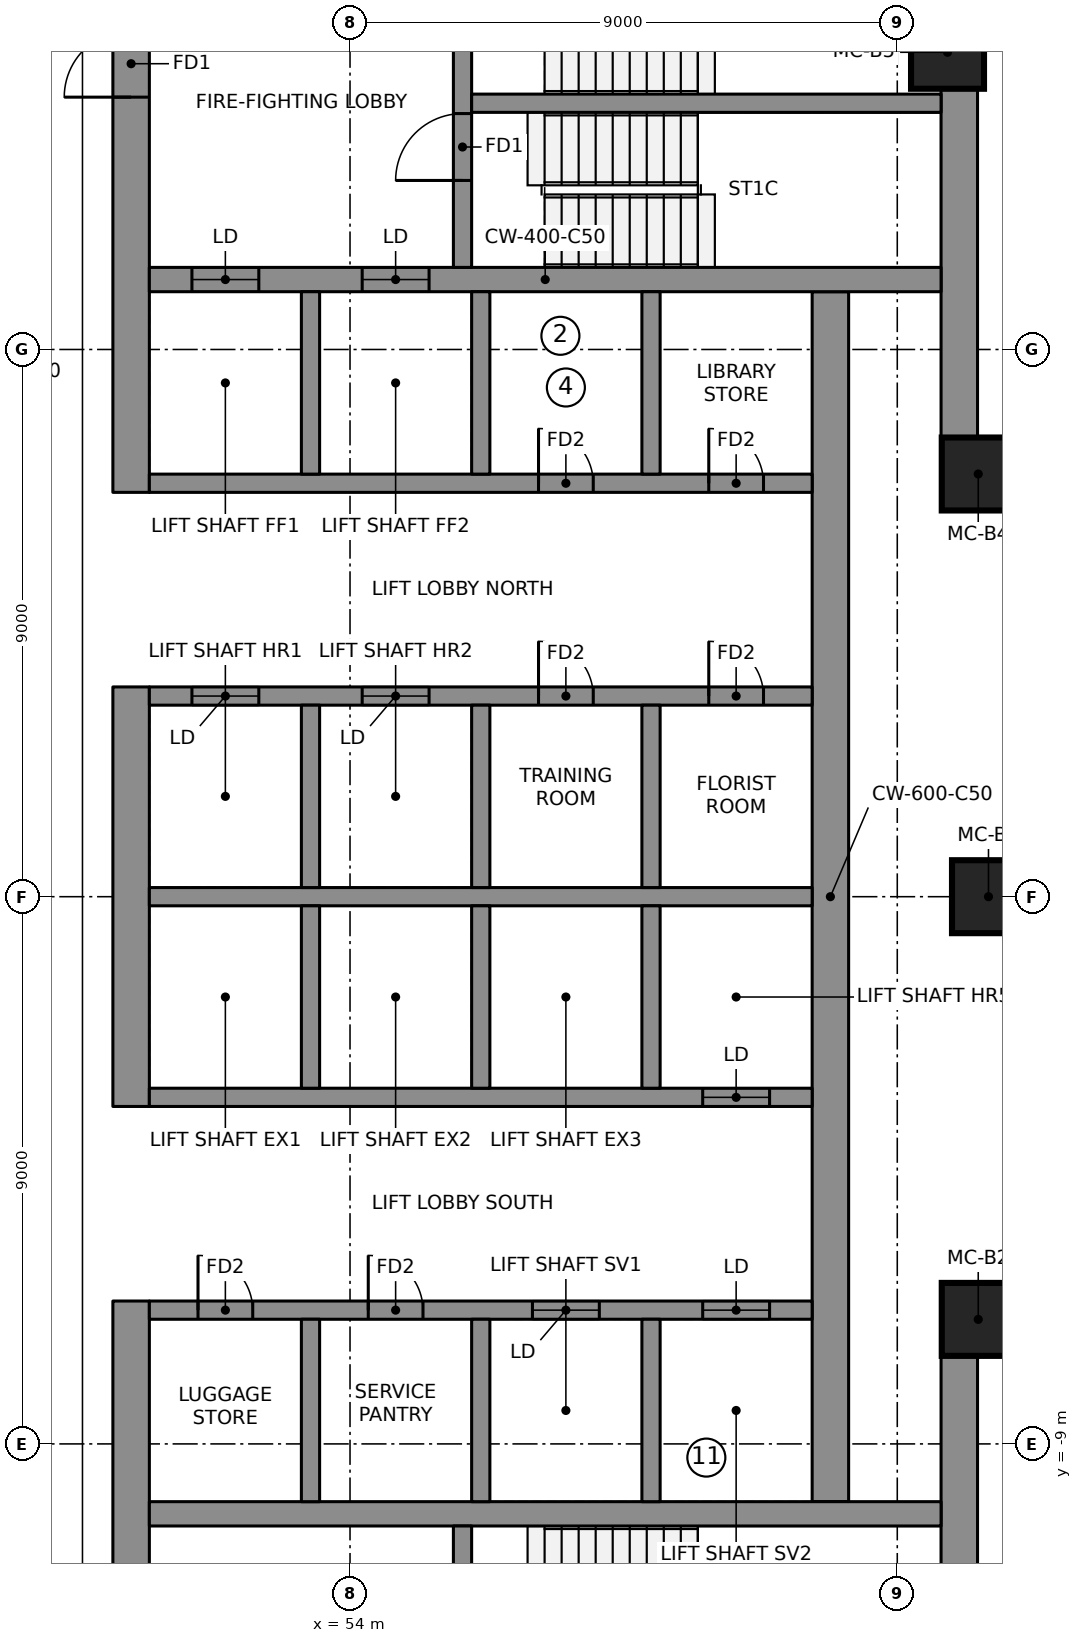
"""IFC4 building model, lengths in metres.
Left out: names, types, materials, properties, quantities, classifications, styles, units other than length and angle.
Written with IfcOpenShell. Run it as: python <this file> out.ifc"""

import sys

from ifc_helpers import new_model, si_unit, direction, frame, frame_2d, origin, origin_2d, place, context, subcontext, project, spatial, rectangle, extrude, element, fill, save


model = new_model("IFC4")
c1 = context("Model", 3, precision=1e-05, world=origin(), true_north=direction((0.0, 1.0)))
c2 = subcontext(c1, "Body", "Model", "MODEL_VIEW")
j1 = project(units=[si_unit("LENGTHUNIT", "METRE"), si_unit("PLANEANGLEUNIT", "RADIAN")], contexts=[c1])
p1 = place(None, origin())
s1 = spatial("IfcSite", under=j1, at=p1, CompositionType="ELEMENT")
p2 = place(p1, origin())
s2 = spatial("IfcBuilding", under=s1, at=p2, CompositionType="ELEMENT")
p3 = place(p2, frame((0.0, 0.0, 231.45)))
s3 = spatial("IfcBuildingStorey", under=s2, at=p3, CompositionType="ELEMENT", Elevation=231.45)
p4 = place(p3, frame((50.4, 6.65, 0.0), z_axis=(0.0, 0.0, 1.0), x_axis=(0.0, 1.0, 0.0)))
e1 = element("IfcWall", 1, at=p4, inside=s3, PredefinedType="SHEAR", context=c2, shape_type="SweptSolid", body=[
    extrude(rectangle(XDim=9.7, YDim=0.6, at=frame_2d((4.85, 0.0))), origin(), (0.0, 0.0, 1.0), 3.55),
])
p5 = place(p4, frame((6.5, 0.0, 0.0)))
e2 = element("IfcOpeningElement", 2, at=p5, cuts=e1, PredefinedType="OPENING", context=c2, shape_type="SweptSolid", body=[
    extrude(rectangle(XDim=1.1, YDim=2.1, at=frame_2d((0.55, 1.05))), frame((0.0, 0.31, 0.0), z_axis=(0.0, -1.0, 0.0), x_axis=(1.0, 0.0, 0.0)), (0.0, 0.0, 1.0), 0.62),
])
p6 = place(p3, frame((50.4, -3.45, 0.0), z_axis=(0.0, 0.0, 1.0), x_axis=(0.0, 1.0, 0.0)))
e3 = element("IfcWall", 3, at=p6, inside=s3, PredefinedType="SHEAR", context=c2, shape_type="SweptSolid", body=[
    extrude(rectangle(XDim=6.9, YDim=0.6, at=frame_2d((3.45, 0.0))), origin(), (0.0, 0.0, 1.0), 3.55),
])
p7 = place(p3, frame((50.4, -16.35, 0.0), z_axis=(0.0, 0.0, 1.0), x_axis=(0.0, 1.0, 0.0)))
e4 = element("IfcWall", 4, at=p7, inside=s3, PredefinedType="SHEAR", context=c2, shape_type="SweptSolid", body=[
    extrude(rectangle(XDim=9.7, YDim=0.6, at=frame_2d((4.85, 0.0))), origin(), (0.0, 0.0, 1.0), 3.55),
])
p8 = place(p7, frame((2.1, 0.0, 0.0)))
e5 = element("IfcOpeningElement", 5, at=p8, cuts=e4, PredefinedType="OPENING", context=c2, shape_type="SweptSolid", body=[
    extrude(rectangle(XDim=1.1, YDim=2.1, at=frame_2d((0.55, 1.05))), frame((0.0, 0.31, 0.0), z_axis=(0.0, -1.0, 0.0), x_axis=(1.0, 0.0, 0.0)), (0.0, 0.0, 1.0), 0.62),
])
for number, where, z_axis, x_axis in (
    (6, (64.02, 7.502, 0.0), (0.0, 0.0, 1.0), (0.0, 1.0, 0.0)),
    (7, (64.02, -15.75, 0.0), (0.0, 0.0, 1.0), (0.0, 1.0, 0.0)),
):
    element("IfcWall", number, at=place(p3, frame(where, z_axis=z_axis, x_axis=x_axis)), inside=s3, PredefinedType="SHEAR", context=c2, shape_type="SweptSolid", body=[
        extrude(rectangle(XDim=8.248, YDim=0.6, at=frame_2d((4.124, 0.0))), origin(), (0.0, 0.0, 1.0), 3.55),
    ])
p9 = place(p3, frame((61.9, -9.95, 0.0), z_axis=(0.0, 0.0, 1.0), x_axis=(0.0, 1.0, 0.0)))
e8 = element("IfcWall", 8, at=p9, inside=s3, PredefinedType="SHEAR", context=c2, shape_type="SweptSolid", body=[
    extrude(rectangle(XDim=19.9, YDim=0.6, at=frame_2d((9.95, 0.0))), origin(), (0.0, 0.0, 1.0), 3.55),
])
p10 = place(p3, frame((50.7, 10.15, 0.0), z_axis=(0.0, 0.0, 1.0), x_axis=(1.0, 0.0, 0.0)))
e9 = element("IfcWall", 9, at=p10, inside=s3, PredefinedType="SHEAR", context=c2, shape_type="SweptSolid", body=[
    extrude(rectangle(XDim=13.02, YDim=0.4, at=frame_2d((6.51, 0.0))), origin(), (0.0, 0.0, 1.0), 3.55),
])
p11 = place(p10, frame((0.7, 0.0, 0.0)))
e10 = element("IfcOpeningElement", 10, at=p11, cuts=e9, PredefinedType="OPENING", context=c2, shape_type="SweptSolid", body=[
    extrude(rectangle(XDim=1.1, YDim=2.1, at=frame_2d((0.55, 1.05))), frame((0.0, 0.21, 0.0), z_axis=(0.0, -1.0, 0.0), x_axis=(1.0, 0.0, 0.0)), (0.0, 0.0, 1.0), 0.42),
])
p12 = place(p10, frame((3.5, 0.0, 0.0)))
e11 = element("IfcOpeningElement", 11, at=p12, cuts=e9, PredefinedType="OPENING", context=c2, shape_type="SweptSolid", body=[
    extrude(rectangle(XDim=1.1, YDim=2.1, at=frame_2d((0.55, 1.05))), frame((0.0, 0.21, 0.0), z_axis=(0.0, -1.0, 0.0), x_axis=(1.0, 0.0, 0.0)), (0.0, 0.0, 1.0), 0.42),
])
p13 = place(p3, frame((50.7, -10.15, 0.0), z_axis=(0.0, 0.0, 1.0), x_axis=(1.0, 0.0, 0.0)))
e12 = element("IfcWall", 12, at=p13, inside=s3, PredefinedType="SHEAR", context=c2, shape_type="SweptSolid", body=[
    extrude(rectangle(XDim=13.02, YDim=0.4, at=frame_2d((6.51, 0.0))), origin(), (0.0, 0.0, 1.0), 3.55),
])
p14 = place(p3, frame((50.7, 0.0, 0.0), z_axis=(0.0, 0.0, 1.0), x_axis=(1.0, 0.0, 0.0)))
e13 = element("IfcWall", 13, at=p14, inside=s3, PredefinedType="SHEAR", context=c2, shape_type="SweptSolid", body=[
    extrude(rectangle(XDim=10.9, YDim=0.3, at=frame_2d((5.45, 0.0))), origin(), (0.0, 0.0, 1.0), 3.55),
])
p15 = place(p3, frame((50.7, 3.3, 0.0), z_axis=(0.0, 0.0, 1.0), x_axis=(1.0, 0.0, 0.0)))
e14 = element("IfcWall", 14, at=p15, inside=s3, PredefinedType="SHEAR", context=c2, shape_type="SweptSolid", body=[
    extrude(rectangle(XDim=10.9, YDim=0.3, at=frame_2d((5.45, 0.0))), origin(), (0.0, 0.0, 1.0), 3.55),
])
p16 = place(p15, frame((0.7, 0.0, 0.0)))
e15 = element("IfcOpeningElement", 15, at=p16, cuts=e14, PredefinedType="OPENING", context=c2, shape_type="SweptSolid", body=[
    extrude(rectangle(XDim=1.1, YDim=2.1, at=frame_2d((0.55, 1.05))), frame((0.0, 0.16, 0.0), z_axis=(0.0, -1.0, 0.0), x_axis=(1.0, 0.0, 0.0)), (0.0, 0.0, 1.0), 0.32),
])
p17 = place(p15, frame((3.5, 0.0, 0.0)))
e16 = element("IfcOpeningElement", 16, at=p17, cuts=e14, PredefinedType="OPENING", context=c2, shape_type="SweptSolid", body=[
    extrude(rectangle(XDim=1.1, YDim=2.1, at=frame_2d((0.55, 1.05))), frame((0.0, 0.16, 0.0), z_axis=(0.0, -1.0, 0.0), x_axis=(1.0, 0.0, 0.0)), (0.0, 0.0, 1.0), 0.32),
])
p18 = place(p15, frame((6.4, 0.0, 0.0)))
e17 = element("IfcOpeningElement", 17, at=p18, cuts=e14, PredefinedType="OPENING", context=c2, shape_type="SweptSolid", body=[
    extrude(rectangle(XDim=0.9, YDim=2.1, at=frame_2d((0.45, 1.05))), frame((0.0, 0.16, 0.0), z_axis=(0.0, -1.0, 0.0), x_axis=(1.0, 0.0, 0.0)), (0.0, 0.0, 1.0), 0.32),
])
p19 = place(p15, frame((9.2, 0.0, 0.0)))
e18 = element("IfcOpeningElement", 18, at=p19, cuts=e14, PredefinedType="OPENING", context=c2, shape_type="SweptSolid", body=[
    extrude(rectangle(XDim=0.9, YDim=2.1, at=frame_2d((0.45, 1.05))), frame((0.0, 0.16, 0.0), z_axis=(0.0, -1.0, 0.0), x_axis=(1.0, 0.0, 0.0)), (0.0, 0.0, 1.0), 0.32),
])
p20 = place(p3, frame((50.7, 6.8, 0.0), z_axis=(0.0, 0.0, 1.0), x_axis=(1.0, 0.0, 0.0)))
e19 = element("IfcWall", 19, at=p20, inside=s3, PredefinedType="SHEAR", context=c2, shape_type="SweptSolid", body=[
    extrude(rectangle(XDim=10.9, YDim=0.3, at=frame_2d((5.45, 0.0))), origin(), (0.0, 0.0, 1.0), 3.55),
])
p21 = place(p20, frame((6.4, 0.0, 0.0)))
e20 = element("IfcOpeningElement", 20, at=p21, cuts=e19, PredefinedType="OPENING", context=c2, shape_type="SweptSolid", body=[
    extrude(rectangle(XDim=0.9, YDim=2.1, at=frame_2d((0.45, 1.05))), frame((0.0, 0.16, 0.0), z_axis=(0.0, -1.0, 0.0), x_axis=(1.0, 0.0, 0.0)), (0.0, 0.0, 1.0), 0.32),
])
p22 = place(p20, frame((9.2, 0.0, 0.0)))
e21 = element("IfcOpeningElement", 21, at=p22, cuts=e19, PredefinedType="OPENING", context=c2, shape_type="SweptSolid", body=[
    extrude(rectangle(XDim=0.9, YDim=2.1, at=frame_2d((0.45, 1.05))), frame((0.0, 0.16, 0.0), z_axis=(0.0, -1.0, 0.0), x_axis=(1.0, 0.0, 0.0)), (0.0, 0.0, 1.0), 0.32),
])
for number, where, z_axis, x_axis in (
    (22, (53.35, 0.15, 0.0), (0.0, 0.0, 1.0), (0.0, 1.0, 0.0)),
    (23, (53.35, 6.95, 0.0), (0.0, 0.0, 1.0), (0.0, 1.0, 0.0)),
    (24, (56.15, 0.15, 0.0), (0.0, 0.0, 1.0), (0.0, 1.0, 0.0)),
    (25, (56.15, 6.95, 0.0), (0.0, 0.0, 1.0), (0.0, 1.0, 0.0)),
    (26, (58.95, 0.15, 0.0), (0.0, 0.0, 1.0), (0.0, 1.0, 0.0)),
    (27, (58.95, 6.95, 0.0), (0.0, 0.0, 1.0), (0.0, 1.0, 0.0)),
):
    element("IfcWall", number, at=place(p3, frame(where, z_axis=z_axis, x_axis=x_axis)), inside=s3, PredefinedType="SHEAR", context=c2, shape_type="SweptSolid", body=[
        extrude(rectangle(XDim=3.0, YDim=0.3, at=frame_2d((1.5, 0.0))), origin(), (0.0, 0.0, 1.0), 3.55),
    ])
p23 = place(p3, frame((50.7, -3.3, 0.0), z_axis=(0.0, 0.0, 1.0), x_axis=(1.0, 0.0, 0.0)))
e28 = element("IfcWall", 28, at=p23, inside=s3, PredefinedType="SHEAR", context=c2, shape_type="SweptSolid", body=[
    extrude(rectangle(XDim=10.9, YDim=0.3, at=frame_2d((5.45, 0.0))), origin(), (0.0, 0.0, 1.0), 3.55),
])
p24 = place(p23, frame((9.1, 0.0, 0.0)))
e29 = element("IfcOpeningElement", 29, at=p24, cuts=e28, PredefinedType="OPENING", context=c2, shape_type="SweptSolid", body=[
    extrude(rectangle(XDim=1.1, YDim=2.1, at=frame_2d((0.55, 1.05))), frame((0.0, 0.16, 0.0), z_axis=(0.0, -1.0, 0.0), x_axis=(1.0, 0.0, 0.0)), (0.0, 0.0, 1.0), 0.32),
])
p25 = place(p3, frame((50.7, -6.8, 0.0), z_axis=(0.0, 0.0, 1.0), x_axis=(1.0, 0.0, 0.0)))
e30 = element("IfcWall", 30, at=p25, inside=s3, PredefinedType="SHEAR", context=c2, shape_type="SweptSolid", body=[
    extrude(rectangle(XDim=10.9, YDim=0.3, at=frame_2d((5.45, 0.0))), origin(), (0.0, 0.0, 1.0), 3.55),
])
p26 = place(p25, frame((6.3, 0.0, 0.0)))
e31 = element("IfcOpeningElement", 31, at=p26, cuts=e30, PredefinedType="OPENING", context=c2, shape_type="SweptSolid", body=[
    extrude(rectangle(XDim=1.1, YDim=2.1, at=frame_2d((0.55, 1.05))), frame((0.0, 0.16, 0.0), z_axis=(0.0, -1.0, 0.0), x_axis=(1.0, 0.0, 0.0)), (0.0, 0.0, 1.0), 0.32),
])
p27 = place(p25, frame((9.1, 0.0, 0.0)))
e32 = element("IfcOpeningElement", 32, at=p27, cuts=e30, PredefinedType="OPENING", context=c2, shape_type="SweptSolid", body=[
    extrude(rectangle(XDim=1.1, YDim=2.1, at=frame_2d((0.55, 1.05))), frame((0.0, 0.16, 0.0), z_axis=(0.0, -1.0, 0.0), x_axis=(1.0, 0.0, 0.0)), (0.0, 0.0, 1.0), 0.32),
])
p28 = place(p25, frame((0.8, 0.0, 0.0)))
e33 = element("IfcOpeningElement", 33, at=p28, cuts=e30, PredefinedType="OPENING", context=c2, shape_type="SweptSolid", body=[
    extrude(rectangle(XDim=0.9, YDim=2.1, at=frame_2d((0.45, 1.05))), frame((0.0, 0.16, 0.0), z_axis=(0.0, -1.0, 0.0), x_axis=(1.0, 0.0, 0.0)), (0.0, 0.0, 1.0), 0.32),
])
p29 = place(p25, frame((3.6, 0.0, 0.0)))
e34 = element("IfcOpeningElement", 34, at=p29, cuts=e30, PredefinedType="OPENING", context=c2, shape_type="SweptSolid", body=[
    extrude(rectangle(XDim=0.9, YDim=2.1, at=frame_2d((0.45, 1.05))), frame((0.0, 0.16, 0.0), z_axis=(0.0, -1.0, 0.0), x_axis=(1.0, 0.0, 0.0)), (0.0, 0.0, 1.0), 0.32),
])
for number, where, z_axis, x_axis in (
    (35, (53.35, -3.15, 0.0), (0.0, 0.0, 1.0), (0.0, 1.0, 0.0)),
    (36, (53.35, -9.95, 0.0), (0.0, 0.0, 1.0), (0.0, 1.0, 0.0)),
    (37, (56.15, -3.15, 0.0), (0.0, 0.0, 1.0), (0.0, 1.0, 0.0)),
    (38, (56.15, -9.95, 0.0), (0.0, 0.0, 1.0), (0.0, 1.0, 0.0)),
    (39, (58.95, -3.15, 0.0), (0.0, 0.0, 1.0), (0.0, 1.0, 0.0)),
    (40, (58.95, -9.95, 0.0), (0.0, 0.0, 1.0), (0.0, 1.0, 0.0)),
):
    element("IfcWall", number, at=place(p3, frame(where, z_axis=z_axis, x_axis=x_axis)), inside=s3, PredefinedType="SHEAR", context=c2, shape_type="SweptSolid", body=[
        extrude(rectangle(XDim=3.0, YDim=0.3, at=frame_2d((1.5, 0.0))), origin(), (0.0, 0.0, 1.0), 3.55),
    ])
p30 = place(p3, frame((55.85, 10.35, 0.0), z_axis=(0.0, 0.0, 1.0), x_axis=(0.0, 1.0, 0.0)))
e41 = element("IfcWall", 41, at=p30, inside=s3, PredefinedType="SHEAR", context=c2, shape_type="SweptSolid", body=[
    extrude(rectangle(XDim=5.4, YDim=0.3, at=frame_2d((2.7, 0.0))), origin(), (0.0, 0.0, 1.0), 3.55),
])
p31 = place(p30, frame((1.43, 0.0, 0.0)))
e42 = element("IfcOpeningElement", 42, at=p31, cuts=e41, PredefinedType="OPENING", context=c2, shape_type="SweptSolid", body=[
    extrude(rectangle(XDim=1.1, YDim=2.1, at=frame_2d((0.55, 1.05))), frame((0.0, 0.16, 0.0), z_axis=(0.0, -1.0, 0.0), x_axis=(1.0, 0.0, 0.0)), (0.0, 0.0, 1.0), 0.32),
])
p32 = place(p30, frame((3.6, 0.0, 0.0)))
e43 = element("IfcOpeningElement", 43, at=p32, cuts=e41, PredefinedType="OPENING", context=c2, shape_type="SweptSolid", body=[
    extrude(rectangle(XDim=1.1, YDim=2.1, at=frame_2d((0.55, 1.05))), frame((0.0, 0.16, 0.0), z_axis=(0.0, -1.0, 0.0), x_axis=(1.0, 0.0, 0.0)), (0.0, 0.0, 1.0), 0.32),
])
p33 = place(p3, frame((55.85, -15.75, 0.0), z_axis=(0.0, 0.0, 1.0), x_axis=(0.0, 1.0, 0.0)))
e44 = element("IfcWall", 44, at=p33, inside=s3, PredefinedType="SHEAR", context=c2, shape_type="SweptSolid", body=[
    extrude(rectangle(XDim=5.4, YDim=0.3, at=frame_2d((2.7, 0.0))), origin(), (0.0, 0.0, 1.0), 3.55),
])
p34 = place(p33, frame((3.6, 0.0, 0.0)))
e45 = element("IfcOpeningElement", 45, at=p34, cuts=e44, PredefinedType="OPENING", context=c2, shape_type="SweptSolid", body=[
    extrude(rectangle(XDim=1.1, YDim=2.1, at=frame_2d((0.55, 1.05))), frame((0.0, 0.16, 0.0), z_axis=(0.0, -1.0, 0.0), x_axis=(1.0, 0.0, 0.0)), (0.0, 0.0, 1.0), 0.32),
])
p35 = place(p33, frame((0.8, 0.0, 0.0)))
e46 = element("IfcOpeningElement", 46, at=p35, cuts=e44, PredefinedType="OPENING", context=c2, shape_type="SweptSolid", body=[
    extrude(rectangle(XDim=0.9, YDim=2.1, at=frame_2d((0.45, 1.05))), frame((0.0, 0.16, 0.0), z_axis=(0.0, -1.0, 0.0), x_axis=(1.0, 0.0, 0.0)), (0.0, 0.0, 1.0), 0.32),
])
p36 = place(p3, frame((56.0, 13.05, 0.0), z_axis=(0.0, 0.0, 1.0), x_axis=(1.0, 0.0, 0.0)))
e47 = element("IfcWall", 47, at=p36, inside=s3, PredefinedType="SHEAR", context=c2, shape_type="SweptSolid", body=[
    extrude(rectangle(XDim=7.72, YDim=0.3, at=frame_2d((3.86, 0.0))), origin(), (0.0, 0.0, 1.0), 3.55),
])
for number, where, z_axis, x_axis in (
    (48, (64.332, -6.952, 0.0), (0.0, 0.0, 1.0), (1.0, 0.0, 0.0)),
    (49, (64.5, 0.0, 0.0), (0.0, 0.0, 1.0), (1.0, 0.0, 0.0)),
    (50, (64.332, 6.952, 0.0), (0.0, 0.0, 1.0), (1.0, 0.0, 0.0)),
    (51, (63.826, 13.888, 0.0), (0.0, 0.0, 1.0), (1.0, 0.0, 0.0)),
):
    element("IfcColumn", number, at=place(p3, frame(where, z_axis=z_axis, x_axis=x_axis)), inside=s3, PredefinedType="COLUMN", context=c2, shape_type="SweptSolid", body=[
        extrude(rectangle(XDim=1.2, YDim=1.2, at=origin_2d()), origin(), (0.0, 0.0, 1.0), 3.55),
    ])
p37 = place(p11, origin())
e52 = element("IfcDoor", 52, at=p37, inside=s3, OperationType="DOUBLE_DOOR_SLIDING", PredefinedType="DOOR", context=c2, shape_type="SweptSolid", body=[
    extrude(rectangle(XDim=1.1, YDim=2.1, at=frame_2d((0.55, 1.05))), frame((0.0, 0.025, 0.0), z_axis=(0.0, -1.0, 0.0), x_axis=(1.0, 0.0, 0.0)), (0.0, 0.0, 1.0), 0.05),
])
fill(e10, e52)
p38 = place(p12, origin())
e53 = element("IfcDoor", 53, at=p38, inside=s3, OperationType="DOUBLE_DOOR_SLIDING", PredefinedType="DOOR", context=c2, shape_type="SweptSolid", body=[
    extrude(rectangle(XDim=1.1, YDim=2.1, at=frame_2d((0.55, 1.05))), frame((0.0, 0.025, 0.0), z_axis=(0.0, -1.0, 0.0), x_axis=(1.0, 0.0, 0.0)), (0.0, 0.0, 1.0), 0.05),
])
fill(e11, e53)
p39 = place(p16, origin())
e54 = element("IfcDoor", 54, at=p39, inside=s3, OperationType="DOUBLE_DOOR_SLIDING", PredefinedType="DOOR", context=c2, shape_type="SweptSolid", body=[
    extrude(rectangle(XDim=1.1, YDim=2.1, at=frame_2d((0.55, 1.05))), frame((0.0, 0.025, 0.0), z_axis=(0.0, -1.0, 0.0), x_axis=(1.0, 0.0, 0.0)), (0.0, 0.0, 1.0), 0.05),
])
fill(e15, e54)
p40 = place(p17, origin())
e55 = element("IfcDoor", 55, at=p40, inside=s3, OperationType="DOUBLE_DOOR_SLIDING", PredefinedType="DOOR", context=c2, shape_type="SweptSolid", body=[
    extrude(rectangle(XDim=1.1, YDim=2.1, at=frame_2d((0.55, 1.05))), frame((0.0, 0.025, 0.0), z_axis=(0.0, -1.0, 0.0), x_axis=(1.0, 0.0, 0.0)), (0.0, 0.0, 1.0), 0.05),
])
fill(e16, e55)
p41 = place(p24, origin())
e56 = element("IfcDoor", 56, at=p41, inside=s3, OperationType="DOUBLE_DOOR_SLIDING", PredefinedType="DOOR", context=c2, shape_type="SweptSolid", body=[
    extrude(rectangle(XDim=1.1, YDim=2.1, at=frame_2d((0.55, 1.05))), frame((0.0, 0.025, 0.0), z_axis=(0.0, -1.0, 0.0), x_axis=(1.0, 0.0, 0.0)), (0.0, 0.0, 1.0), 0.05),
])
fill(e29, e56)
p42 = place(p26, origin())
e57 = element("IfcDoor", 57, at=p42, inside=s3, OperationType="DOUBLE_DOOR_SLIDING", PredefinedType="DOOR", context=c2, shape_type="SweptSolid", body=[
    extrude(rectangle(XDim=1.1, YDim=2.1, at=frame_2d((0.55, 1.05))), frame((0.0, 0.025, 0.0), z_axis=(0.0, -1.0, 0.0), x_axis=(1.0, 0.0, 0.0)), (0.0, 0.0, 1.0), 0.05),
])
fill(e31, e57)
p43 = place(p27, origin())
e58 = element("IfcDoor", 58, at=p43, inside=s3, OperationType="DOUBLE_DOOR_SLIDING", PredefinedType="DOOR", context=c2, shape_type="SweptSolid", body=[
    extrude(rectangle(XDim=1.1, YDim=2.1, at=frame_2d((0.55, 1.05))), frame((0.0, 0.025, 0.0), z_axis=(0.0, -1.0, 0.0), x_axis=(1.0, 0.0, 0.0)), (0.0, 0.0, 1.0), 0.05),
])
fill(e32, e58)
p44 = place(p31, origin())
e59 = element("IfcDoor", 59, at=p44, inside=s3, OperationType="SINGLE_SWING_RIGHT", PredefinedType="DOOR", context=c2, shape_type="SweptSolid", body=[
    extrude(rectangle(XDim=1.1, YDim=2.1, at=frame_2d((0.55, 1.05))), frame((0.0, 0.025, 0.0), z_axis=(0.0, -1.0, 0.0), x_axis=(1.0, 0.0, 0.0)), (0.0, 0.0, 1.0), 0.05),
])
fill(e42, e59)
p45 = place(p5, origin())
e60 = element("IfcDoor", 60, at=p45, inside=s3, OperationType="SINGLE_SWING_RIGHT", PredefinedType="DOOR", context=c2, shape_type="SweptSolid", body=[
    extrude(rectangle(XDim=1.1, YDim=2.1, at=frame_2d((0.55, 1.05))), frame((0.0, 0.025, 0.0), z_axis=(0.0, -1.0, 0.0), x_axis=(1.0, 0.0, 0.0)), (0.0, 0.0, 1.0), 0.05),
])
fill(e2, e60)
p46 = place(p21, origin())
e61 = element("IfcDoor", 61, at=p46, inside=s3, OperationType="SINGLE_SWING_LEFT", PredefinedType="DOOR", context=c2, shape_type="SweptSolid", body=[
    extrude(rectangle(XDim=0.9, YDim=2.1, at=frame_2d((0.45, 1.05))), frame((0.0, 0.025, 0.0), z_axis=(0.0, -1.0, 0.0), x_axis=(1.0, 0.0, 0.0)), (0.0, 0.0, 1.0), 0.05),
])
fill(e20, e61)
p47 = place(p22, origin())
e62 = element("IfcDoor", 62, at=p47, inside=s3, OperationType="SINGLE_SWING_LEFT", PredefinedType="DOOR", context=c2, shape_type="SweptSolid", body=[
    extrude(rectangle(XDim=0.9, YDim=2.1, at=frame_2d((0.45, 1.05))), frame((0.0, 0.025, 0.0), z_axis=(0.0, -1.0, 0.0), x_axis=(1.0, 0.0, 0.0)), (0.0, 0.0, 1.0), 0.05),
])
fill(e21, e62)
p48 = place(p18, origin())
e63 = element("IfcDoor", 63, at=p48, inside=s3, OperationType="SINGLE_SWING_LEFT", PredefinedType="DOOR", context=c2, shape_type="SweptSolid", body=[
    extrude(rectangle(XDim=0.9, YDim=2.1, at=frame_2d((0.45, 1.05))), frame((0.0, 0.025, 0.0), z_axis=(0.0, -1.0, 0.0), x_axis=(1.0, 0.0, 0.0)), (0.0, 0.0, 1.0), 0.05),
])
fill(e17, e63)
p49 = place(p19, origin())
e64 = element("IfcDoor", 64, at=p49, inside=s3, OperationType="SINGLE_SWING_LEFT", PredefinedType="DOOR", context=c2, shape_type="SweptSolid", body=[
    extrude(rectangle(XDim=0.9, YDim=2.1, at=frame_2d((0.45, 1.05))), frame((0.0, 0.025, 0.0), z_axis=(0.0, -1.0, 0.0), x_axis=(1.0, 0.0, 0.0)), (0.0, 0.0, 1.0), 0.05),
])
fill(e18, e64)
p50 = place(p28, origin())
e65 = element("IfcDoor", 65, at=p50, inside=s3, OperationType="SINGLE_SWING_LEFT", PredefinedType="DOOR", context=c2, shape_type="SweptSolid", body=[
    extrude(rectangle(XDim=0.9, YDim=2.1, at=frame_2d((0.45, 1.05))), frame((0.0, 0.025, 0.0), z_axis=(0.0, -1.0, 0.0), x_axis=(1.0, 0.0, 0.0)), (0.0, 0.0, 1.0), 0.05),
])
fill(e33, e65)
p51 = place(p29, origin())
e66 = element("IfcDoor", 66, at=p51, inside=s3, OperationType="SINGLE_SWING_LEFT", PredefinedType="DOOR", context=c2, shape_type="SweptSolid", body=[
    extrude(rectangle(XDim=0.9, YDim=2.1, at=frame_2d((0.45, 1.05))), frame((0.0, 0.025, 0.0), z_axis=(0.0, -1.0, 0.0), x_axis=(1.0, 0.0, 0.0)), (0.0, 0.0, 1.0), 0.05),
])
fill(e34, e66)
save(model, sys.argv[1])
